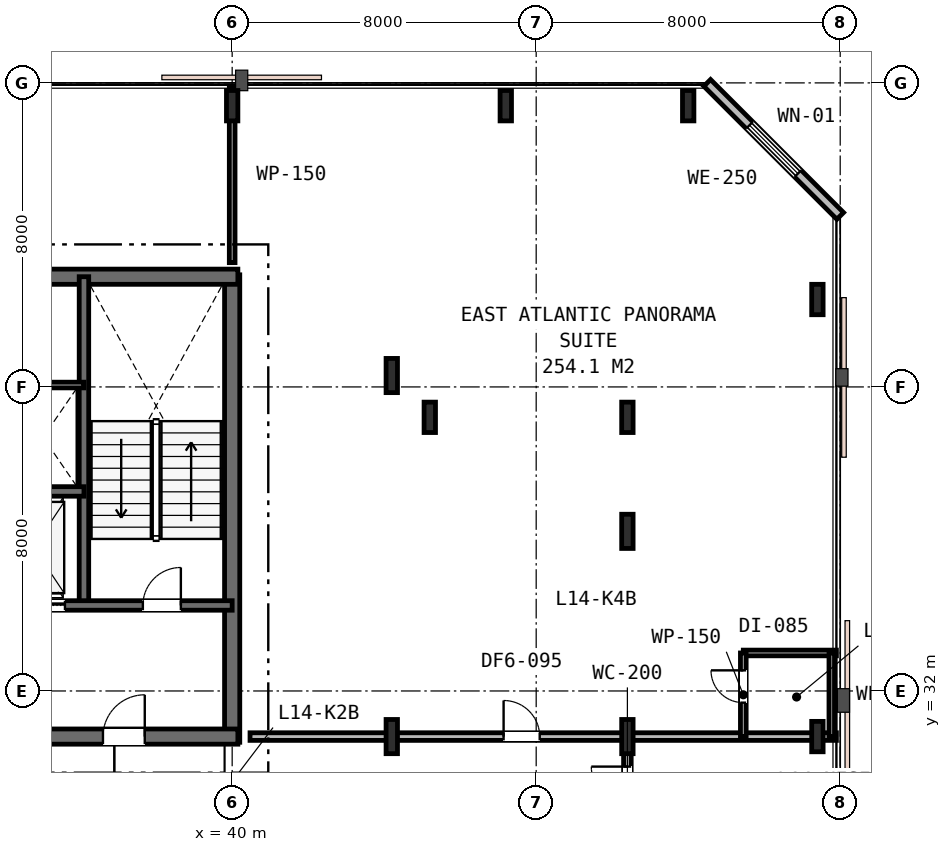
"""IFC4 building model, lengths in metres.
Left out: names, types, materials, properties, quantities, classifications, styles, units other than length and angle.
Written with IfcOpenShell. Run it as: python <this file> out.ifc"""

import sys

from ifc_helpers import new_model, si_unit, direction, frame, frame_2d, origin, origin_2d, place, context, subcontext, project, spatial, rectangle, i_section, extrude, element, fill, save


model = new_model("IFC4")
c1 = context("Model", 3, precision=1e-05, world=origin(), true_north=direction((0.0, 1.0)))
c2 = subcontext(c1, "Body", "Model", "MODEL_VIEW")
j1 = project(units=[si_unit("LENGTHUNIT", "METRE"), si_unit("PLANEANGLEUNIT", "RADIAN")], contexts=[c1])
p1 = place(None, origin())
s1 = spatial("IfcSite", under=j1, at=p1, CompositionType="ELEMENT")
p2 = place(p1, origin())
s2 = spatial("IfcBuilding", under=s1, at=p2, CompositionType="ELEMENT")
p3 = place(p2, frame((0.0, 0.0, 58.2)))
s3 = spatial("IfcBuildingStorey", under=s2, at=p3, CompositionType="ELEMENT", Elevation=58.2)
p4 = place(p3, frame((40.0, 30.65, 0.0), z_axis=(0.0, 0.0, 1.0), x_axis=(0.0, 1.0, 0.0)))
e1 = element("IfcWall", 1, at=p4, inside=s3, PredefinedType="SHEAR", context=c2, shape_type="SweptSolid", body=[
    extrude(rectangle(XDim=12.3, YDim=0.4, at=frame_2d((6.15, 0.0))), origin(), (0.0, 0.0, 1.0), 3.6),
])
p5 = place(p3, frame((15.85, 42.9, 0.0), z_axis=(0.0, 0.0, 1.0), x_axis=(1.0, 0.0, 0.0)))
e2 = element("IfcWall", 2, at=p5, inside=s3, PredefinedType="SHEAR", context=c2, shape_type="SweptSolid", body=[
    extrude(rectangle(XDim=24.3, YDim=0.4, at=frame_2d((12.15, 0.0))), origin(), (0.0, 0.0, 1.0), 3.6),
])
p6 = place(p3, frame((28.95, 30.8, 0.0), z_axis=(0.0, 0.0, 1.0), x_axis=(1.0, 0.0, 0.0)))
e3 = element("IfcWall", 3, at=p6, inside=s3, PredefinedType="SHEAR", context=c2, shape_type="SweptSolid", body=[
    extrude(rectangle(XDim=11.2, YDim=0.4, at=frame_2d((5.6, 0.0))), origin(), (0.0, 0.0, 1.0), 3.6),
])
p7 = place(p6, frame((7.65, 0.0, 0.0)))
e4 = element("IfcOpeningElement", 4, at=p7, cuts=e3, PredefinedType="OPENING", context=c2, shape_type="SweptSolid", body=[
    extrude(rectangle(XDim=1.1, YDim=2.15, at=frame_2d((0.55, 1.075))), frame((0.0, 0.21, 0.0), z_axis=(0.0, -1.0, 0.0), x_axis=(1.0, 0.0, 0.0)), (0.0, 0.0, 1.0), 0.42),
])
p8 = place(p3, frame((36.1, 34.25, 0.0), z_axis=(0.0, 0.0, 1.0), x_axis=(0.0, 1.0, 0.0)))
e5 = element("IfcWall", 5, at=p8, inside=s3, PredefinedType="SHEAR", context=c2, shape_type="SweptSolid", body=[
    extrude(rectangle(XDim=8.65, YDim=0.25, at=frame_2d((4.325, 0.0))), origin(), (0.0, 0.0, 1.0), 3.6),
])
p9 = place(p3, frame((33.95, 34.25, 0.0), z_axis=(0.0, 0.0, 1.0), x_axis=(1.0, 0.0, 0.0)))
e6 = element("IfcWall", 6, at=p9, inside=s3, PredefinedType="SHEAR", context=c2, shape_type="SweptSolid", body=[
    extrude(rectangle(XDim=6.05, YDim=0.25, at=frame_2d((3.025, 0.0))), origin(), (0.0, 0.0, 1.0), 3.6),
])
p10 = place(p9, frame((3.7, 0.0, 0.0)))
e7 = element("IfcOpeningElement", 7, at=p10, cuts=e6, PredefinedType="OPENING", context=c2, shape_type="SweptSolid", body=[
    extrude(rectangle(XDim=1.0, YDim=2.15, at=frame_2d((0.5, 1.075))), frame((0.0, 0.135, 0.0), z_axis=(0.0, -1.0, 0.0), x_axis=(1.0, 0.0, 0.0)), (0.0, 0.0, 1.0), 0.27),
])
p11 = place(p9, frame((0.55, 0.0, 0.0)))
e8 = element("IfcOpeningElement", 8, at=p11, cuts=e6, PredefinedType="OPENING", context=c2, shape_type="SweptSolid", body=[
    extrude(rectangle(XDim=1.1, YDim=2.15, at=frame_2d((0.55, 1.075))), frame((0.0, 0.135, 0.0), z_axis=(0.0, -1.0, 0.0), x_axis=(1.0, 0.0, 0.0)), (0.0, 0.0, 1.0), 0.27),
])
p12 = place(p3, frame((19.9, 37.25, 0.0), z_axis=(0.0, 0.0, 1.0), x_axis=(1.0, 0.0, 0.0)))
e9 = element("IfcWall", 9, at=p12, inside=s3, PredefinedType="SHEAR", context=c2, shape_type="SweptSolid", body=[
    extrude(rectangle(XDim=16.2, YDim=0.25, at=frame_2d((8.1, 0.0))), origin(), (0.0, 0.0, 1.0), 3.6),
])
p13 = place(p12, frame((12.55, 0.0, 0.0)))
e10 = element("IfcOpeningElement", 10, at=p13, cuts=e9, PredefinedType="OPENING", context=c2, shape_type="SweptSolid", body=[
    extrude(rectangle(XDim=0.9, YDim=2.15, at=frame_2d((0.45, 1.075))), frame((0.0, 0.135, 0.0), z_axis=(0.0, -1.0, 0.0), x_axis=(1.0, 0.0, 0.0)), (0.0, 0.0, 1.0), 0.27),
])
for number, where, z_axis, x_axis in (
    (11, (45.2, 39.2, 0.0), (0.0, 0.0, 1.0), (1.0, 0.0, 0.0)),
    (12, (40.0, 47.4, 0.0), (0.0, 0.0, 1.0), (1.0, 0.0, 0.0)),
    (13, (47.2, 47.4, 0.0), (0.0, 0.0, 1.0), (1.0, 0.0, 0.0)),
    (14, (50.4, 39.2, 0.0), (0.0, 0.0, 1.0), (1.0, 0.0, 0.0)),
    (15, (55.4, 30.8, 0.0), (0.0, 0.0, 1.0), (1.0, 0.0, 0.0)),
    (16, (55.4, 42.3, 0.0), (0.0, 0.0, 1.0), (1.0, 0.0, 0.0)),
    (17, (52.0, 47.4, 0.0), (0.0, 0.0, 1.0), (1.0, 0.0, 0.0)),
):
    element("IfcColumn", number, at=place(p3, frame(where, z_axis=z_axis, x_axis=x_axis)), inside=s3, PredefinedType="COLUMN", context=c2, shape_type="SweptSolid", body=[
        extrude(i_section(OverallWidth=0.3, OverallDepth=0.8, WebThickness=0.018, FlangeThickness=0.033, FilletRadius=0.03, at=origin_2d()), origin(), (0.0, 0.0, 1.0), 3.6),
    ])
for number, where, z_axis, x_axis in (
    (18, (44.2, 30.8, 0.0), (0.0, 0.0, 1.0), (1.0, 0.0, 0.0)),
    (19, (44.2, 40.3, 0.0), (0.0, 0.0, 1.0), (1.0, 0.0, 0.0)),
    (20, (50.4, 30.8, 0.0), (0.0, 0.0, 1.0), (1.0, 0.0, 0.0)),
    (21, (50.4, 36.2, 0.0), (0.0, 0.0, 1.0), (1.0, 0.0, 0.0)),
):
    element("IfcColumn", number, at=place(p3, frame(where, z_axis=z_axis, x_axis=x_axis)), inside=s3, PredefinedType="COLUMN", context=c2, shape_type="SweptSolid", body=[
        extrude(i_section(OverallWidth=0.3, OverallDepth=0.9, WebThickness=0.018, FlangeThickness=0.035, FilletRadius=0.03, at=origin_2d()), origin(), (0.0, 0.0, 1.0), 3.6),
    ])
p14 = place(p3, frame((56.0, 44.5, 0.0), z_axis=(0.0, 0.0, 1.0), x_axis=(-0.707106781187, 0.707106781187, 0.0)))
e22 = element("IfcWall", 22, at=p14, inside=s3, PredefinedType="STANDARD", context=c2, shape_type="SweptSolid", body=[
    extrude(rectangle(XDim=4.95, YDim=0.25, at=frame_2d((2.475, 0.0))), origin(), (0.0, 0.0, 1.0), 3.33),
])
p15 = place(p14, frame((1.575, 0.0, 0.75)))
e23 = element("IfcOpeningElement", 23, at=p15, cuts=e22, PredefinedType="OPENING", context=c2, shape_type="SweptSolid", body=[
    extrude(rectangle(XDim=1.8, YDim=1.85, at=frame_2d((0.9, 0.925))), frame((0.0, 0.135, 0.0), z_axis=(0.0, -1.0, 0.0), x_axis=(1.0, 0.0, 0.0)), (0.0, 0.0, 1.0), 0.27),
])
p16 = place(p3, frame((34.05, 40.05, 0.0), z_axis=(0.0, 0.0, 1.0), x_axis=(1.0, 0.0, 0.0)))
e24 = element("IfcWall", 24, at=p16, inside=s3, PredefinedType="PARTITIONING", context=c2, shape_type="SweptSolid", body=[
    extrude(rectangle(XDim=2.05, YDim=0.15, at=frame_2d((1.025, 0.0))), origin(), (0.0, 0.0, 1.0), 3.33),
])
p17 = place(p3, frame((40.0, 43.27, 0.0), z_axis=(0.0, 0.0, 1.0), x_axis=(0.0, 1.0, 0.0)))
e25 = element("IfcWall", 25, at=p17, inside=s3, PredefinedType="PARTITIONING", context=c2, shape_type="SweptSolid", body=[
    extrude(rectangle(XDim=4.63, YDim=0.15, at=frame_2d((2.315, 0.0))), origin(), (0.0, 0.0, 1.0), 2.93),
])
p18 = place(p3, frame((40.47, 30.8, 0.0), z_axis=(0.0, 0.0, 1.0), x_axis=(1.0, 0.0, 0.0)))
e26 = element("IfcWall", 26, at=p18, inside=s3, PredefinedType="PARTITIONING", context=c2, shape_type="SweptSolid", body=[
    extrude(rectangle(XDim=15.43, YDim=0.2, at=frame_2d((7.715, 0.0))), origin(), (0.0, 0.0, 1.0), 2.82),
])
p19 = place(p18, frame((6.673, 0.0, 0.0)))
e27 = element("IfcOpeningElement", 27, at=p19, cuts=e26, PredefinedType="OPENING", context=c2, shape_type="SweptSolid", body=[
    extrude(rectangle(XDim=0.95, YDim=2.15, at=frame_2d((0.475, 1.075))), frame((0.0, 0.11, 0.0), z_axis=(0.0, -1.0, 0.0), x_axis=(1.0, 0.0, 0.0)), (0.0, 0.0, 1.0), 0.22),
])
p20 = place(p3, frame((53.45, 33.0, 0.0), z_axis=(0.0, 0.0, 1.0), x_axis=(1.0, 0.0, 0.0)))
e28 = element("IfcWall", 28, at=p20, inside=s3, PredefinedType="PARTITIONING", context=c2, shape_type="SweptSolid", body=[
    extrude(rectangle(XDim=2.45, YDim=0.15, at=frame_2d((1.225, 0.0))), origin(), (0.0, 0.0, 1.0), 2.93),
])
p21 = place(p3, frame((53.45, 30.8, 0.0), z_axis=(0.0, 0.0, 1.0), x_axis=(0.0, 1.0, 0.0)))
e29 = element("IfcWall", 29, at=p21, inside=s3, PredefinedType="PARTITIONING", context=c2, shape_type="SweptSolid", body=[
    extrude(rectangle(XDim=2.2, YDim=0.15, at=frame_2d((1.1, 0.0))), origin(), (0.0, 0.0, 1.0), 2.82),
])
p22 = place(p21, frame((0.892, 0.0, 0.0)))
e30 = element("IfcOpeningElement", 30, at=p22, cuts=e29, PredefinedType="OPENING", context=c2, shape_type="SweptSolid", body=[
    extrude(rectangle(XDim=0.85, YDim=2.15, at=frame_2d((0.425, 1.075))), frame((0.0, 0.085, 0.0), z_axis=(0.0, -1.0, 0.0), x_axis=(1.0, 0.0, 0.0)), (0.0, 0.0, 1.0), 0.17),
])
p23 = place(p3, frame((55.78, 33.0, 0.0), z_axis=(0.0, 0.0, 1.0), x_axis=(0.0, -1.0, 0.0)))
e31 = element("IfcWall", 31, at=p23, inside=s3, PredefinedType="PARTITIONING", context=c2, shape_type="SweptSolid", body=[
    extrude(rectangle(XDim=2.2, YDim=0.15, at=frame_2d((1.1, 0.0))), origin(), (0.0, 0.0, 1.0), 2.82),
])
p24 = place(p3, frame((50.4, 28.6, 0.0), z_axis=(0.0, 0.0, 1.0), x_axis=(0.0, 1.0, 0.0)))
e32 = element("IfcWall", 32, at=p24, inside=s3, PredefinedType="PARTITIONING", context=c2, shape_type="SweptSolid", body=[
    extrude(rectangle(XDim=2.2, YDim=0.2, at=frame_2d((1.1, 0.0))), origin(), (0.0, 0.0, 1.0), 2.82),
])
p25 = place(p24, frame((0.46, 0.0, 0.0)))
e33 = element("IfcOpeningElement", 33, at=p25, cuts=e32, PredefinedType="OPENING", context=c2, shape_type="SweptSolid", body=[
    extrude(rectangle(XDim=0.95, YDim=2.15, at=frame_2d((0.475, 1.075))), frame((0.0, 0.11, 0.0), z_axis=(0.0, -1.0, 0.0), x_axis=(1.0, 0.0, 0.0)), (0.0, 0.0, 1.0), 0.22),
])
p26 = place(p15, origin())
e34 = element("IfcWindow", 34, at=p26, inside=s3, PartitioningType="SINGLE_PANEL", PredefinedType="WINDOW", context=c2, shape_type="SweptSolid", body=[
    extrude(rectangle(XDim=1.8, YDim=1.85, at=frame_2d((0.9, 0.925))), frame((0.0, 0.03, 0.0), z_axis=(0.0, -1.0, 0.0), x_axis=(1.0, 0.0, 0.0)), (0.0, 0.0, 1.0), 0.06),
])
fill(e23, e34)
p27 = place(p10, origin())
e35 = element("IfcDoor", 35, at=p27, inside=s3, OperationType="SINGLE_SWING_RIGHT", PredefinedType="DOOR", context=c2, shape_type="SweptSolid", body=[
    extrude(rectangle(XDim=1.0, YDim=2.15, at=frame_2d((0.5, 1.075))), frame((0.0, 0.025, 0.0), z_axis=(0.0, -1.0, 0.0), x_axis=(1.0, 0.0, 0.0)), (0.0, 0.0, 1.0), 0.05),
])
fill(e7, e35)
p28 = place(p7, origin())
e36 = element("IfcDoor", 36, at=p28, inside=s3, OperationType="SINGLE_SWING_RIGHT", PredefinedType="DOOR", context=c2, shape_type="SweptSolid", body=[
    extrude(rectangle(XDim=1.1, YDim=2.15, at=frame_2d((0.55, 1.075))), frame((0.0, 0.025, 0.0), z_axis=(0.0, -1.0, 0.0), x_axis=(1.0, 0.0, 0.0)), (0.0, 0.0, 1.0), 0.05),
])
fill(e4, e36)
p29 = place(p19, origin())
e37 = element("IfcDoor", 37, at=p29, inside=s3, OperationType="SINGLE_SWING_LEFT", PredefinedType="DOOR", context=c2, shape_type="SweptSolid", body=[
    extrude(rectangle(XDim=0.95, YDim=2.15, at=frame_2d((0.475, 1.075))), frame((0.0, 0.025, 0.0), z_axis=(0.0, -1.0, 0.0), x_axis=(1.0, 0.0, 0.0)), (0.0, 0.0, 1.0), 0.05),
])
fill(e27, e37)
p30 = place(p22, origin())
e38 = element("IfcDoor", 38, at=p30, inside=s3, OperationType="SINGLE_SWING_RIGHT", PredefinedType="DOOR", context=c2, shape_type="SweptSolid", body=[
    extrude(rectangle(XDim=0.85, YDim=2.15, at=frame_2d((0.425, 1.075))), frame((0.0, 0.025, 0.0), z_axis=(0.0, -1.0, 0.0), x_axis=(1.0, 0.0, 0.0)), (0.0, 0.0, 1.0), 0.05),
])
fill(e30, e38)
p31 = place(p25, origin())
e39 = element("IfcDoor", 39, at=p31, inside=s3, OperationType="SINGLE_SWING_RIGHT", PredefinedType="DOOR", context=c2, shape_type="SweptSolid", body=[
    extrude(rectangle(XDim=0.95, YDim=2.15, at=frame_2d((0.475, 1.075))), frame((0.0, 0.025, 0.0), z_axis=(0.0, -1.0, 0.0), x_axis=(1.0, 0.0, 0.0)), (0.0, 0.0, 1.0), 0.05),
])
fill(e33, e39)
p32 = place(p11, origin())
e40 = element("IfcDoor", 40, at=p32, inside=s3, OperationType="DOUBLE_DOOR_SLIDING", PredefinedType="DOOR", context=c2, shape_type="SweptSolid", body=[
    extrude(rectangle(XDim=1.1, YDim=2.15, at=frame_2d((0.55, 1.075))), frame((0.0, 0.025, 0.0), z_axis=(0.0, -1.0, 0.0), x_axis=(1.0, 0.0, 0.0)), (0.0, 0.0, 1.0), 0.05),
])
fill(e8, e40)
save(model, sys.argv[1])
